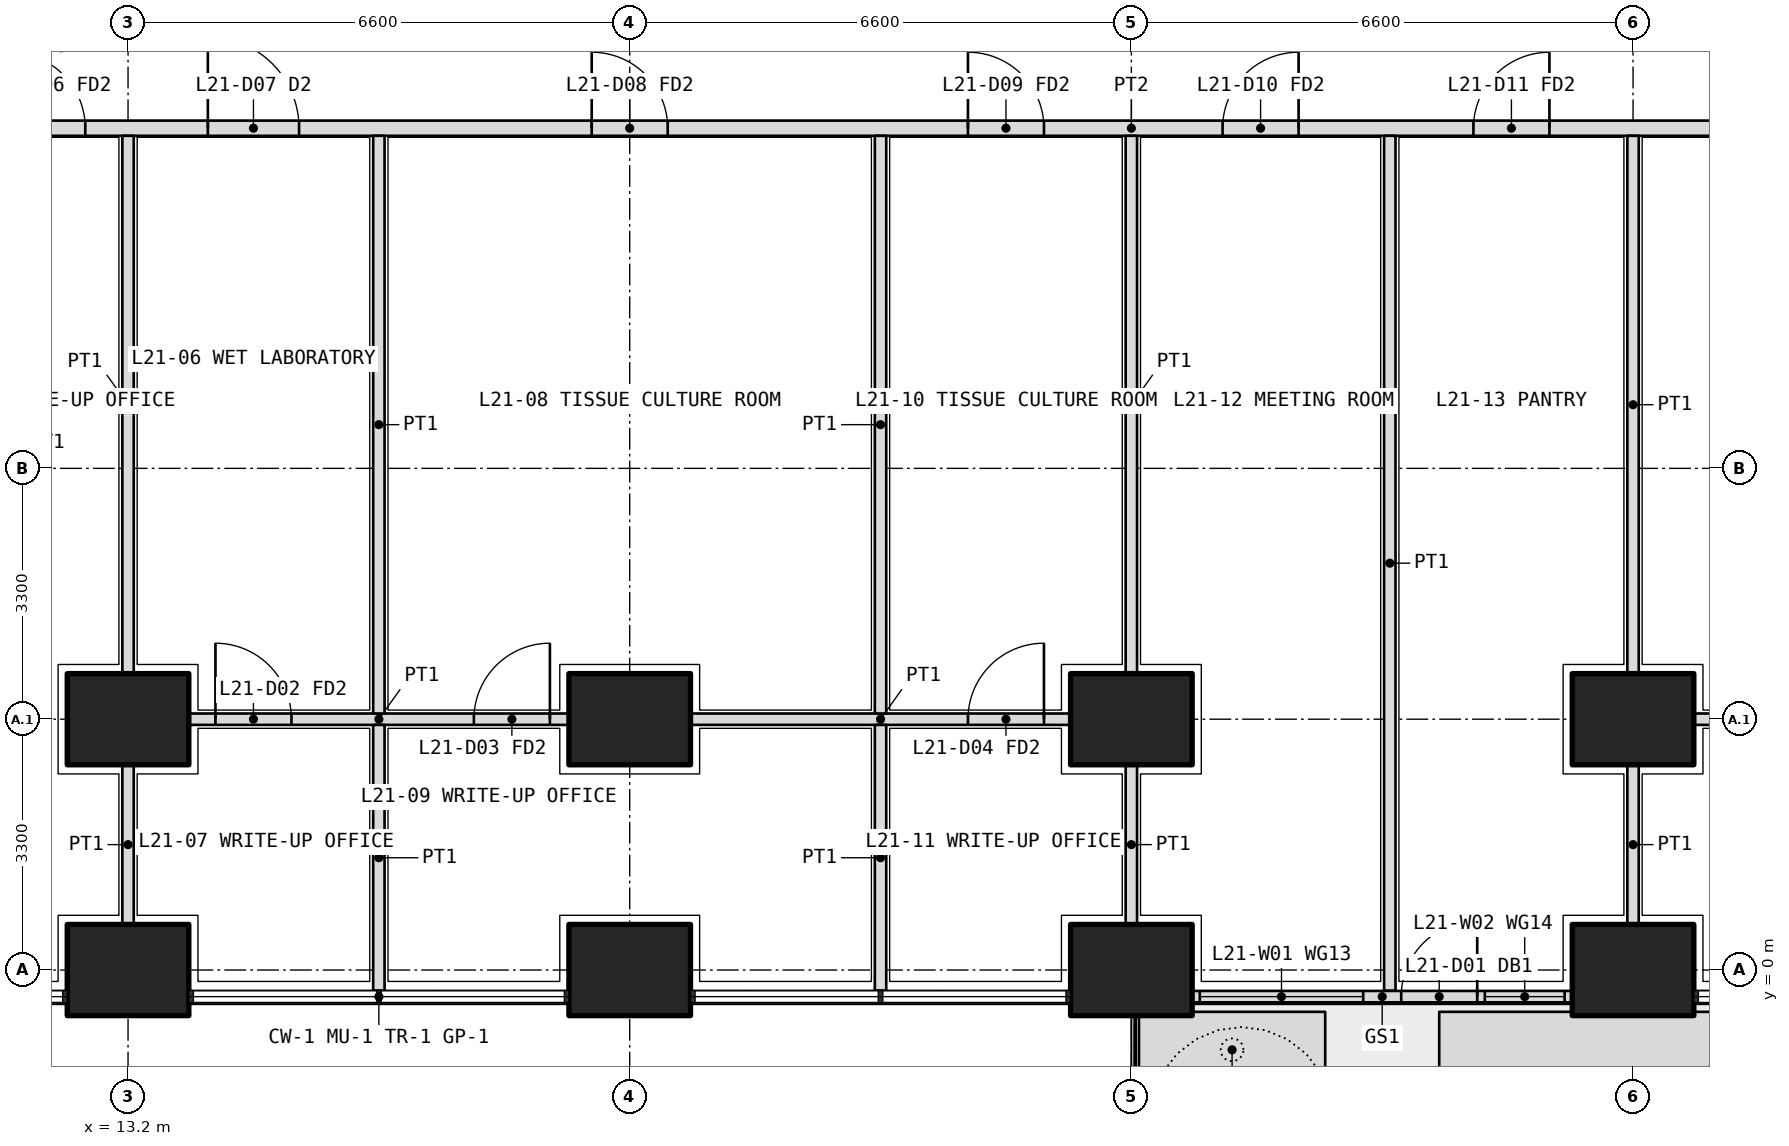
"""IFC4 building model, lengths in metres.
Left out: names, types, materials, properties, quantities, classifications, styles, units other than length and angle.
Written with IfcOpenShell. Run it as: python <this file> out.ifc"""

import sys

from ifc_helpers import new_model, si_unit, direction, frame, frame_2d, origin, origin_2d, place, context, subcontext, project, spatial, polyline, rectangle, outline, extrude, element, fill, save


model = new_model("IFC4")
c1 = context("Model", 3, precision=1e-05, world=origin(), true_north=direction((0.0, 1.0)))
c2 = subcontext(c1, "Body", "Model", "MODEL_VIEW")
j1 = project(units=[si_unit("LENGTHUNIT", "METRE"), si_unit("PLANEANGLEUNIT", "RADIAN")], contexts=[c1])
p1 = place(None, origin())
s1 = spatial("IfcSite", under=j1, at=p1, CompositionType="ELEMENT")
p2 = place(p1, origin())
s2 = spatial("IfcBuilding", under=s1, at=p2, CompositionType="ELEMENT")
p3 = place(p2, frame((0.0, 0.0, 94.8)))
s3 = spatial("IfcBuildingStorey", under=s2, at=p3, CompositionType="ELEMENT", Elevation=94.8)
for number, where, z_axis, x_axis in (
    (1, (13.2, 0.0, 0.0), (0.0, 0.0, 1.0), (1.0, 0.0, 0.0)),
    (2, (19.8, 0.0, 0.0), (0.0, 0.0, 1.0), (1.0, 0.0, 0.0)),
    (3, (26.4, 0.0, 0.0), (0.0, 0.0, 1.0), (1.0, 0.0, 0.0)),
    (4, (33.0, 0.0, 0.0), (0.0, 0.0, 1.0), (1.0, 0.0, 0.0)),
    (5, (13.2, 3.3, 0.0), (0.0, 0.0, 1.0), (1.0, 0.0, 0.0)),
    (6, (19.8, 3.3, 0.0), (0.0, 0.0, 1.0), (1.0, 0.0, 0.0)),
    (7, (26.4, 3.3, 0.0), (0.0, 0.0, 1.0), (1.0, 0.0, 0.0)),
    (8, (33.0, 3.3, 0.0), (0.0, 0.0, 1.0), (1.0, 0.0, 0.0)),
):
    element("IfcColumn", number, at=place(p3, frame(where, z_axis=z_axis, x_axis=x_axis)), inside=s3, PredefinedType="COLUMN", context=c2, shape_type="SweptSolid", body=[
        extrude(rectangle(XDim=1.6, YDim=1.2, at=origin_2d()), origin(), (0.0, 0.0, 1.0), 4.2),
    ])
p4 = place(p3, origin())
e9 = element("IfcWall", 9, at=p4, inside=s3, PredefinedType="USERDEFINED", context=c2, shape_type="SweptSolid", body=[
    extrude(outline(polyline([(26.5, -1.55), (28.95, -1.55), (28.95, -0.55), (26.5, -0.55), (26.5, -1.55)]), holes=[polyline([(26.65, -1.4), (28.8, -1.4), (28.8, -0.7), (26.65, -0.7), (26.65, -1.4)])]), origin(), (0.0, 0.0, 1.0), 1.05),
])
p5 = place(p3, origin())
e10 = element("IfcWall", 10, at=p5, inside=s3, PredefinedType="USERDEFINED", context=c2, shape_type="SweptSolid", body=[
    extrude(outline(polyline([(30.45, -1.55), (39.5, -1.55), (39.5, -0.55), (30.45, -0.55), (30.45, -1.55)]), holes=[polyline([(30.6, -1.4), (39.35, -1.4), (39.35, -0.7), (30.6, -0.7), (30.6, -1.4)])]), origin(), (0.0, 0.0, 1.0), 1.05),
])
p6 = place(p3, frame((27.2, -0.35, 0.0), z_axis=(0.0, 0.0, 1.0), x_axis=(1.0, 0.0, 0.0)))
e11 = element("IfcWall", 11, at=p6, inside=s3, PredefinedType="SOLIDWALL", context=c2, shape_type="SweptSolid", body=[
    extrude(rectangle(XDim=5.0, YDim=0.15, at=frame_2d((2.5, 0.0))), origin(), (0.0, 0.0, 1.0), 2.7),
])
p7 = place(p6, frame((2.75, 0.0, 0.0)))
e12 = element("IfcOpeningElement", 12, at=p7, cuts=e11, PredefinedType="OPENING", context=c2, shape_type="SweptSolid", body=[
    extrude(rectangle(XDim=1.0, YDim=2.4, at=frame_2d((0.5, 1.2))), frame((0.0, 0.085, 0.0), z_axis=(0.0, -1.0, 0.0), x_axis=(1.0, 0.0, 0.0)), (0.0, 0.0, 1.0), 0.17),
])
p8 = place(p6, frame((0.1, 0.0, 0.1)))
e13 = element("IfcOpeningElement", 13, at=p8, cuts=e11, PredefinedType="OPENING", context=c2, shape_type="SweptSolid", body=[
    extrude(rectangle(XDim=2.15, YDim=2.3, at=frame_2d((1.075, 1.15))), frame((0.0, 0.085, 0.0), z_axis=(0.0, -1.0, 0.0), x_axis=(1.0, 0.0, 0.0)), (0.0, 0.0, 1.0), 0.17),
])
p9 = place(p6, frame((3.85, 0.0, 0.1)))
e14 = element("IfcOpeningElement", 14, at=p9, cuts=e11, PredefinedType="OPENING", context=c2, shape_type="SweptSolid", body=[
    extrude(rectangle(XDim=1.05, YDim=2.3, at=frame_2d((0.525, 1.15))), frame((0.0, 0.085, 0.0), z_axis=(0.0, -1.0, 0.0), x_axis=(1.0, 0.0, 0.0)), (0.0, 0.0, 1.0), 0.17),
])
p10 = place(p3, frame((10.975, 11.075, 0.0), z_axis=(0.0, 0.0, 1.0), x_axis=(1.0, 0.0, 0.0)))
e15 = element("IfcWall", 15, at=p10, inside=s3, PredefinedType="PARTITIONING", context=c2, shape_type="SweptSolid", body=[
    extrude(rectangle(XDim=30.85, YDim=0.2, at=frame_2d((15.425, 0.0))), origin(), (0.0, 0.0, 1.0), 2.85),
])
p11 = place(p10, frame((0.663, 0.0, 0.0)))
e16 = element("IfcOpeningElement", 16, at=p11, cuts=e15, PredefinedType="OPENING", context=c2, shape_type="SweptSolid", body=[
    extrude(rectangle(XDim=1.0, YDim=2.1, at=frame_2d((0.5, 1.05))), frame((0.0, 0.11, 0.0), z_axis=(0.0, -1.0, 0.0), x_axis=(1.0, 0.0, 0.0)), (0.0, 0.0, 1.0), 0.22),
])
p12 = place(p10, frame((3.275, 0.0, 0.0)))
e17 = element("IfcOpeningElement", 17, at=p12, cuts=e15, PredefinedType="OPENING", context=c2, shape_type="SweptSolid", body=[
    extrude(rectangle(XDim=1.2, YDim=2.1, at=frame_2d((0.6, 1.05))), frame((0.0, 0.11, 0.0), z_axis=(0.0, -1.0, 0.0), x_axis=(1.0, 0.0, 0.0)), (0.0, 0.0, 1.0), 0.22),
])
p13 = place(p10, frame((8.325, 0.0, 0.0)))
e18 = element("IfcOpeningElement", 18, at=p13, cuts=e15, PredefinedType="OPENING", context=c2, shape_type="SweptSolid", body=[
    extrude(rectangle(XDim=1.0, YDim=2.1, at=frame_2d((0.5, 1.05))), frame((0.0, 0.11, 0.0), z_axis=(0.0, -1.0, 0.0), x_axis=(1.0, 0.0, 0.0)), (0.0, 0.0, 1.0), 0.22),
])
p14 = place(p10, frame((13.275, 0.0, 0.0)))
e19 = element("IfcOpeningElement", 19, at=p14, cuts=e15, PredefinedType="OPENING", context=c2, shape_type="SweptSolid", body=[
    extrude(rectangle(XDim=1.0, YDim=2.1, at=frame_2d((0.5, 1.05))), frame((0.0, 0.11, 0.0), z_axis=(0.0, -1.0, 0.0), x_axis=(1.0, 0.0, 0.0)), (0.0, 0.0, 1.0), 0.22),
])
p15 = place(p10, frame((16.625, 0.0, 0.0)))
e20 = element("IfcOpeningElement", 20, at=p15, cuts=e15, PredefinedType="OPENING", context=c2, shape_type="SweptSolid", body=[
    extrude(rectangle(XDim=1.0, YDim=2.1, at=frame_2d((0.5, 1.05))), frame((0.0, 0.11, 0.0), z_axis=(0.0, -1.0, 0.0), x_axis=(1.0, 0.0, 0.0)), (0.0, 0.0, 1.0), 0.22),
])
p16 = place(p10, frame((19.925, 0.0, 0.0)))
e21 = element("IfcOpeningElement", 21, at=p16, cuts=e15, PredefinedType="OPENING", context=c2, shape_type="SweptSolid", body=[
    extrude(rectangle(XDim=1.0, YDim=2.1, at=frame_2d((0.5, 1.05))), frame((0.0, 0.11, 0.0), z_axis=(0.0, -1.0, 0.0), x_axis=(1.0, 0.0, 0.0)), (0.0, 0.0, 1.0), 0.22),
])
p17 = place(p10, frame((25.887, 0.0, 0.0)))
e22 = element("IfcOpeningElement", 22, at=p17, cuts=e15, PredefinedType="OPENING", context=c2, shape_type="SweptSolid", body=[
    extrude(rectangle(XDim=1.0, YDim=2.1, at=frame_2d((0.5, 1.05))), frame((0.0, 0.11, 0.0), z_axis=(0.0, -1.0, 0.0), x_axis=(1.0, 0.0, 0.0)), (0.0, 0.0, 1.0), 0.22),
])
p18 = place(p3, frame((14.0, 3.3, 0.0), z_axis=(0.0, 0.0, 1.0), x_axis=(1.0, 0.0, 0.0)))
e23 = element("IfcWall", 23, at=p18, inside=s3, PredefinedType="PARTITIONING", context=c2, shape_type="SweptSolid", body=[
    extrude(rectangle(XDim=5.0, YDim=0.15, at=frame_2d((2.5, 0.0))), origin(), (0.0, 0.0, 1.0), 3.9),
])
p19 = place(p18, frame((0.35, 0.0, 0.0)))
e24 = element("IfcOpeningElement", 24, at=p19, cuts=e23, PredefinedType="OPENING", context=c2, shape_type="SweptSolid", body=[
    extrude(rectangle(XDim=1.0, YDim=2.1, at=frame_2d((0.5, 1.05))), frame((0.0, 0.085, 0.0), z_axis=(0.0, -1.0, 0.0), x_axis=(1.0, 0.0, 0.0)), (0.0, 0.0, 1.0), 0.17),
])
p20 = place(p18, frame((3.75, 0.0, 0.0)))
e25 = element("IfcOpeningElement", 25, at=p20, cuts=e23, PredefinedType="OPENING", context=c2, shape_type="SweptSolid", body=[
    extrude(rectangle(XDim=1.0, YDim=2.1, at=frame_2d((0.5, 1.05))), frame((0.0, 0.085, 0.0), z_axis=(0.0, -1.0, 0.0), x_axis=(1.0, 0.0, 0.0)), (0.0, 0.0, 1.0), 0.17),
])
p21 = place(p3, frame((20.6, 3.3, 0.0), z_axis=(0.0, 0.0, 1.0), x_axis=(1.0, 0.0, 0.0)))
e26 = element("IfcWall", 26, at=p21, inside=s3, PredefinedType="PARTITIONING", context=c2, shape_type="SweptSolid", body=[
    extrude(rectangle(XDim=5.0, YDim=0.15, at=frame_2d((2.5, 0.0))), origin(), (0.0, 0.0, 1.0), 3.9),
])
p22 = place(p21, frame((3.65, 0.0, 0.0)))
e27 = element("IfcOpeningElement", 27, at=p22, cuts=e26, PredefinedType="OPENING", context=c2, shape_type="SweptSolid", body=[
    extrude(rectangle(XDim=1.0, YDim=2.1, at=frame_2d((0.5, 1.05))), frame((0.0, 0.085, 0.0), z_axis=(0.0, -1.0, 0.0), x_axis=(1.0, 0.0, 0.0)), (0.0, 0.0, 1.0), 0.17),
])
p23 = place(p3, frame((33.8, 3.3, 0.0), z_axis=(0.0, 0.0, 1.0), x_axis=(1.0, 0.0, 0.0)))
e28 = element("IfcWall", 28, at=p23, inside=s3, PredefinedType="PARTITIONING", context=c2, shape_type="SweptSolid", body=[
    extrude(rectangle(XDim=5.0, YDim=0.15, at=frame_2d((2.5, 0.0))), origin(), (0.0, 0.0, 1.0), 3.9),
])
p24 = place(p3, frame((29.8, -0.27, 0.0), z_axis=(0.0, 0.0, 1.0), x_axis=(0.0, 1.0, 0.0)))
e29 = element("IfcWall", 29, at=p24, inside=s3, PredefinedType="PARTITIONING", context=c2, shape_type="SweptSolid", body=[
    extrude(rectangle(XDim=11.245, YDim=0.15, at=frame_2d((5.623, 0.0))), origin(), (0.0, 0.0, 1.0), 2.7),
])
p25 = place(p3, frame((33.0, 0.6, 0.0), z_axis=(0.0, 0.0, 1.0), x_axis=(0.0, 1.0, 0.0)))
e30 = element("IfcWall", 30, at=p25, inside=s3, PredefinedType="PARTITIONING", context=c2, shape_type="SweptSolid", body=[
    extrude(rectangle(XDim=2.1, YDim=0.15, at=frame_2d((1.05, 0.0))), origin(), (0.0, 0.0, 1.0), 2.85),
])
p26 = place(p3, frame((33.0, 3.9, 0.0), z_axis=(0.0, 0.0, 1.0), x_axis=(0.0, 1.0, 0.0)))
e31 = element("IfcWall", 31, at=p26, inside=s3, PredefinedType="PARTITIONING", context=c2, shape_type="SweptSolid", body=[
    extrude(rectangle(XDim=7.075, YDim=0.15, at=frame_2d((3.538, 0.0))), origin(), (0.0, 0.0, 1.0), 2.85),
])
p27 = place(p3, frame((13.2, 0.6, 0.0), z_axis=(0.0, 0.0, 1.0), x_axis=(0.0, 1.0, 0.0)))
e32 = element("IfcWall", 32, at=p27, inside=s3, PredefinedType="PARTITIONING", context=c2, shape_type="SweptSolid", body=[
    extrude(rectangle(XDim=2.1, YDim=0.15, at=frame_2d((1.05, 0.0))), origin(), (0.0, 0.0, 1.0), 2.85),
])
p28 = place(p3, frame((13.2, 3.9, 0.0), z_axis=(0.0, 0.0, 1.0), x_axis=(0.0, 1.0, 0.0)))
e33 = element("IfcWall", 33, at=p28, inside=s3, PredefinedType="PARTITIONING", context=c2, shape_type="SweptSolid", body=[
    extrude(rectangle(XDim=7.075, YDim=0.15, at=frame_2d((3.538, 0.0))), origin(), (0.0, 0.0, 1.0), 2.85),
])
p29 = place(p3, frame((16.5, -0.27, 0.0), z_axis=(0.0, 0.0, 1.0), x_axis=(0.0, 1.0, 0.0)))
e34 = element("IfcWall", 34, at=p29, inside=s3, PredefinedType="PARTITIONING", context=c2, shape_type="SweptSolid", body=[
    extrude(rectangle(XDim=3.495, YDim=0.15, at=frame_2d((1.748, 0.0))), origin(), (0.0, 0.0, 1.0), 2.7),
])
p30 = place(p3, frame((16.5, 3.375, 0.0), z_axis=(0.0, 0.0, 1.0), x_axis=(0.0, 1.0, 0.0)))
e35 = element("IfcWall", 35, at=p30, inside=s3, PredefinedType="PARTITIONING", context=c2, shape_type="SweptSolid", body=[
    extrude(rectangle(XDim=7.6, YDim=0.15, at=frame_2d((3.8, 0.0))), origin(), (0.0, 0.0, 1.0), 3.9),
])
p31 = place(p3, frame((23.1, -0.27, 0.0), z_axis=(0.0, 0.0, 1.0), x_axis=(0.0, 1.0, 0.0)))
e36 = element("IfcWall", 36, at=p31, inside=s3, PredefinedType="PARTITIONING", context=c2, shape_type="SweptSolid", body=[
    extrude(rectangle(XDim=3.495, YDim=0.15, at=frame_2d((1.748, 0.0))), origin(), (0.0, 0.0, 1.0), 2.7),
])
p32 = place(p3, frame((23.1, 3.375, 0.0), z_axis=(0.0, 0.0, 1.0), x_axis=(0.0, 1.0, 0.0)))
e37 = element("IfcWall", 37, at=p32, inside=s3, PredefinedType="PARTITIONING", context=c2, shape_type="SweptSolid", body=[
    extrude(rectangle(XDim=7.6, YDim=0.15, at=frame_2d((3.8, 0.0))), origin(), (0.0, 0.0, 1.0), 3.9),
])
p33 = place(p3, frame((26.4, 0.6, 0.0), z_axis=(0.0, 0.0, 1.0), x_axis=(0.0, 1.0, 0.0)))
e38 = element("IfcWall", 38, at=p33, inside=s3, PredefinedType="PARTITIONING", context=c2, shape_type="SweptSolid", body=[
    extrude(rectangle(XDim=2.1, YDim=0.15, at=frame_2d((1.05, 0.0))), origin(), (0.0, 0.0, 1.0), 2.85),
])
p34 = place(p3, frame((26.4, 3.9, 0.0), z_axis=(0.0, 0.0, 1.0), x_axis=(0.0, 1.0, 0.0)))
e39 = element("IfcWall", 39, at=p34, inside=s3, PredefinedType="PARTITIONING", context=c2, shape_type="SweptSolid", body=[
    extrude(rectangle(XDim=7.075, YDim=0.15, at=frame_2d((3.538, 0.0))), origin(), (0.0, 0.0, 1.0), 2.85),
])
p35 = place(p7, origin())
e40 = element("IfcDoor", 40, at=p35, inside=s3, OperationType="SINGLE_SWING_RIGHT", PredefinedType="DOOR", context=c2, shape_type="SweptSolid", body=[
    extrude(rectangle(XDim=1.0, YDim=2.4, at=frame_2d((0.5, 1.2))), frame((0.0, 0.025, 0.0), z_axis=(0.0, -1.0, 0.0), x_axis=(1.0, 0.0, 0.0)), (0.0, 0.0, 1.0), 0.05),
])
fill(e12, e40)
p36 = place(p8, origin())
e41 = element("IfcWindow", 41, at=p36, inside=s3, PartitioningType="SINGLE_PANEL", PredefinedType="WINDOW", context=c2, shape_type="SweptSolid", body=[
    extrude(rectangle(XDim=2.15, YDim=2.3, at=frame_2d((1.075, 1.15))), frame((0.0, 0.03, 0.0), z_axis=(0.0, -1.0, 0.0), x_axis=(1.0, 0.0, 0.0)), (0.0, 0.0, 1.0), 0.06),
])
fill(e13, e41)
p37 = place(p9, origin())
e42 = element("IfcWindow", 42, at=p37, inside=s3, PartitioningType="SINGLE_PANEL", PredefinedType="WINDOW", context=c2, shape_type="SweptSolid", body=[
    extrude(rectangle(XDim=1.05, YDim=2.3, at=frame_2d((0.525, 1.15))), frame((0.0, 0.03, 0.0), z_axis=(0.0, -1.0, 0.0), x_axis=(1.0, 0.0, 0.0)), (0.0, 0.0, 1.0), 0.06),
])
fill(e14, e42)
p38 = place(p11, origin())
e43 = element("IfcDoor", 43, at=p38, inside=s3, OperationType="SINGLE_SWING_LEFT", PredefinedType="DOOR", context=c2, shape_type="SweptSolid", body=[
    extrude(rectangle(XDim=1.0, YDim=2.1, at=frame_2d((0.5, 1.05))), frame((0.0, 0.025, 0.0), z_axis=(0.0, -1.0, 0.0), x_axis=(1.0, 0.0, 0.0)), (0.0, 0.0, 1.0), 0.05),
])
fill(e16, e43)
p39 = place(p12, origin())
e44 = element("IfcDoor", 44, at=p39, inside=s3, OperationType="DOUBLE_DOOR_SINGLE_SWING", PredefinedType="DOOR", context=c2, shape_type="SweptSolid", body=[
    extrude(rectangle(XDim=1.2, YDim=2.1, at=frame_2d((0.6, 1.05))), frame((0.0, 0.025, 0.0), z_axis=(0.0, -1.0, 0.0), x_axis=(1.0, 0.0, 0.0)), (0.0, 0.0, 1.0), 0.05),
])
fill(e17, e44)
p40 = place(p19, origin())
e45 = element("IfcDoor", 45, at=p40, inside=s3, OperationType="SINGLE_SWING_LEFT", PredefinedType="DOOR", context=c2, shape_type="SweptSolid", body=[
    extrude(rectangle(XDim=1.0, YDim=2.1, at=frame_2d((0.5, 1.05))), frame((0.0, 0.025, 0.0), z_axis=(0.0, -1.0, 0.0), x_axis=(1.0, 0.0, 0.0)), (0.0, 0.0, 1.0), 0.05),
])
fill(e24, e45)
p41 = place(p13, origin())
e46 = element("IfcDoor", 46, at=p41, inside=s3, OperationType="SINGLE_SWING_LEFT", PredefinedType="DOOR", context=c2, shape_type="SweptSolid", body=[
    extrude(rectangle(XDim=1.0, YDim=2.1, at=frame_2d((0.5, 1.05))), frame((0.0, 0.025, 0.0), z_axis=(0.0, -1.0, 0.0), x_axis=(1.0, 0.0, 0.0)), (0.0, 0.0, 1.0), 0.05),
])
fill(e18, e46)
p42 = place(p20, origin())
e47 = element("IfcDoor", 47, at=p42, inside=s3, OperationType="SINGLE_SWING_RIGHT", PredefinedType="DOOR", context=c2, shape_type="SweptSolid", body=[
    extrude(rectangle(XDim=1.0, YDim=2.1, at=frame_2d((0.5, 1.05))), frame((0.0, 0.025, 0.0), z_axis=(0.0, -1.0, 0.0), x_axis=(1.0, 0.0, 0.0)), (0.0, 0.0, 1.0), 0.05),
])
fill(e25, e47)
p43 = place(p14, origin())
e48 = element("IfcDoor", 48, at=p43, inside=s3, OperationType="SINGLE_SWING_LEFT", PredefinedType="DOOR", context=c2, shape_type="SweptSolid", body=[
    extrude(rectangle(XDim=1.0, YDim=2.1, at=frame_2d((0.5, 1.05))), frame((0.0, 0.025, 0.0), z_axis=(0.0, -1.0, 0.0), x_axis=(1.0, 0.0, 0.0)), (0.0, 0.0, 1.0), 0.05),
])
fill(e19, e48)
p44 = place(p22, origin())
e49 = element("IfcDoor", 49, at=p44, inside=s3, OperationType="SINGLE_SWING_RIGHT", PredefinedType="DOOR", context=c2, shape_type="SweptSolid", body=[
    extrude(rectangle(XDim=1.0, YDim=2.1, at=frame_2d((0.5, 1.05))), frame((0.0, 0.025, 0.0), z_axis=(0.0, -1.0, 0.0), x_axis=(1.0, 0.0, 0.0)), (0.0, 0.0, 1.0), 0.05),
])
fill(e27, e49)
p45 = place(p15, origin())
e50 = element("IfcDoor", 50, at=p45, inside=s3, OperationType="SINGLE_SWING_RIGHT", PredefinedType="DOOR", context=c2, shape_type="SweptSolid", body=[
    extrude(rectangle(XDim=1.0, YDim=2.1, at=frame_2d((0.5, 1.05))), frame((0.0, 0.025, 0.0), z_axis=(0.0, -1.0, 0.0), x_axis=(1.0, 0.0, 0.0)), (0.0, 0.0, 1.0), 0.05),
])
fill(e20, e50)
p46 = place(p16, origin())
e51 = element("IfcDoor", 51, at=p46, inside=s3, OperationType="SINGLE_SWING_RIGHT", PredefinedType="DOOR", context=c2, shape_type="SweptSolid", body=[
    extrude(rectangle(XDim=1.0, YDim=2.1, at=frame_2d((0.5, 1.05))), frame((0.0, 0.025, 0.0), z_axis=(0.0, -1.0, 0.0), x_axis=(1.0, 0.0, 0.0)), (0.0, 0.0, 1.0), 0.05),
])
fill(e21, e51)
save(model, sys.argv[1])
